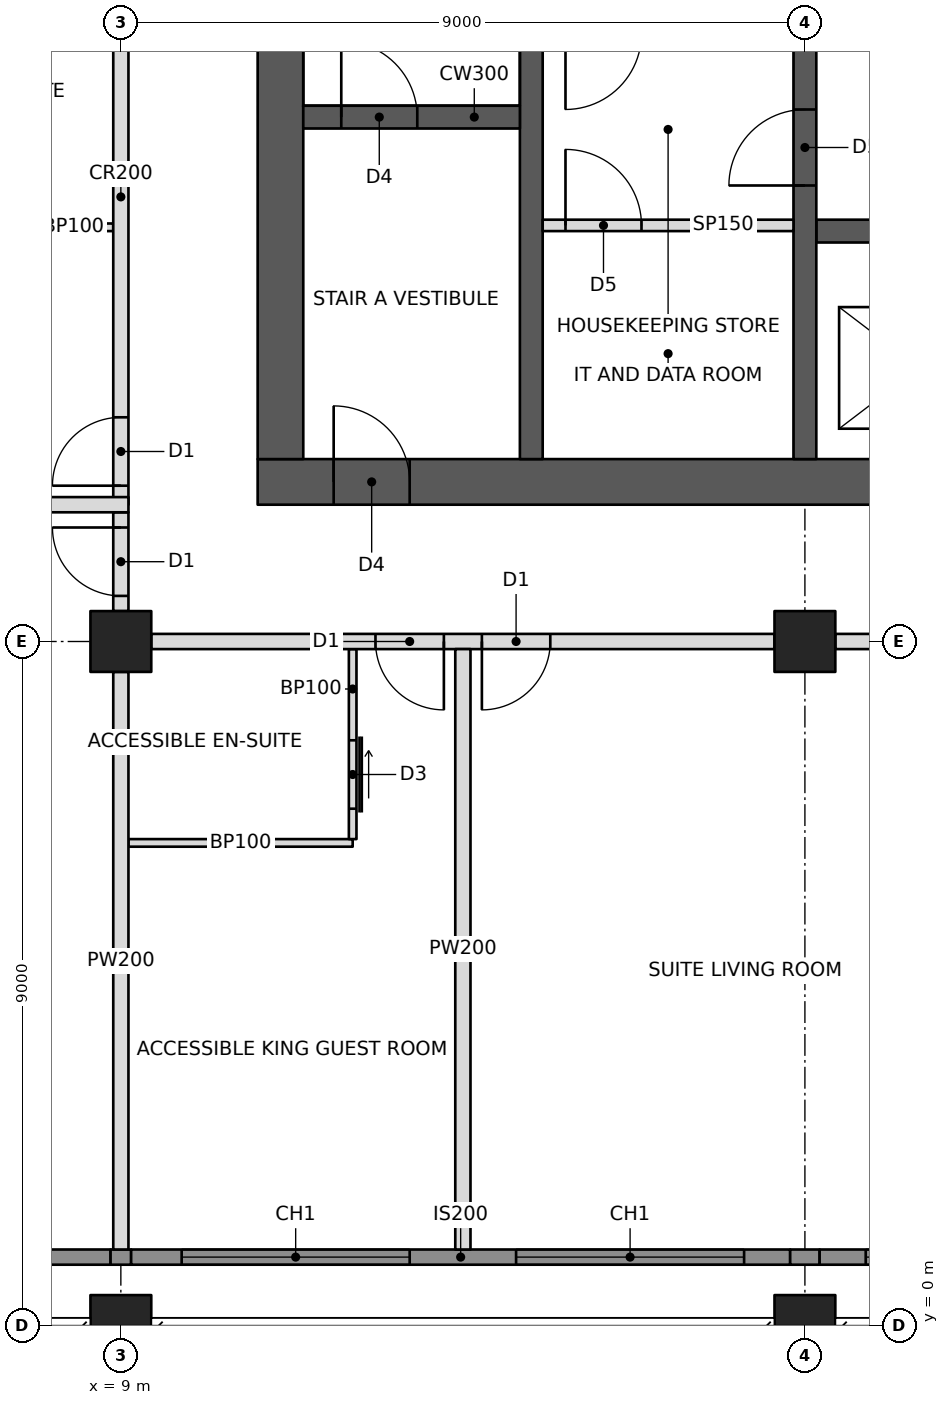
"""IFC4 building model, lengths in metres.
Left out: names, types, materials, properties, quantities, classifications, styles, units other than length and angle.
Written with IfcOpenShell. Run it as: python <this file> out.ifc"""

import sys

from ifc_helpers import new_model, si_unit, direction, frame, frame_2d, origin, origin_2d, place, context, subcontext, project, spatial, rectangle, hollow_rectangle, extrude, element, fill, save


model = new_model("IFC4")
c1 = context("Model", 3, precision=1e-05, world=origin(), true_north=direction((0.0, 1.0)))
c2 = subcontext(c1, "Body", "Model", "MODEL_VIEW")
j1 = project(units=[si_unit("LENGTHUNIT", "METRE"), si_unit("PLANEANGLEUNIT", "RADIAN")], contexts=[c1])
p1 = place(None, origin())
s1 = spatial("IfcSite", under=j1, at=p1, CompositionType="ELEMENT")
p2 = place(p1, origin())
s2 = spatial("IfcBuilding", under=s1, at=p2, CompositionType="ELEMENT")
p3 = place(p2, frame((0.0, 0.0, 194.4)))
s3 = spatial("IfcBuildingStorey", under=s2, at=p3, CompositionType="ELEMENT", Elevation=194.4)
p4 = place(p3, frame((9.0, 0.0, 0.0), z_axis=(0.0, 0.0, 1.0), x_axis=(1.0, 0.0, 0.0)))
e1 = element("IfcColumn", 1, at=p4, inside=s3, PredefinedType="COLUMN", context=c2, shape_type="SweptSolid", body=[
    extrude(hollow_rectangle(XDim=0.8, YDim=0.8, WallThickness=0.06, at=origin_2d()), origin(), (0.0, 0.0, 1.0), 3.4),
])
p5 = place(p3, frame((9.0, 9.0, 0.0), z_axis=(0.0, 0.0, 1.0), x_axis=(1.0, 0.0, 0.0)))
e2 = element("IfcColumn", 2, at=p5, inside=s3, PredefinedType="COLUMN", context=c2, shape_type="SweptSolid", body=[
    extrude(hollow_rectangle(XDim=0.8, YDim=0.8, WallThickness=0.05, at=origin_2d()), origin(), (0.0, 0.0, 1.0), 3.4),
])
p6 = place(p3, frame((18.0, 0.0, 0.0), z_axis=(0.0, 0.0, 1.0), x_axis=(1.0, 0.0, 0.0)))
e3 = element("IfcColumn", 3, at=p6, inside=s3, PredefinedType="COLUMN", context=c2, shape_type="SweptSolid", body=[
    extrude(hollow_rectangle(XDim=0.8, YDim=0.8, WallThickness=0.06, at=origin_2d()), origin(), (0.0, 0.0, 1.0), 3.4),
])
p7 = place(p3, frame((18.0, 9.0, 0.0), z_axis=(0.0, 0.0, 1.0), x_axis=(1.0, 0.0, 0.0)))
e4 = element("IfcColumn", 4, at=p7, inside=s3, PredefinedType="COLUMN", context=c2, shape_type="SweptSolid", body=[
    extrude(hollow_rectangle(XDim=0.8, YDim=0.8, WallThickness=0.05, at=origin_2d()), origin(), (0.0, 0.0, 1.0), 3.4),
])
p8 = place(p3, frame((10.8, 11.1, 0.0), z_axis=(0.0, 0.0, 1.0), x_axis=(1.0, 0.0, 0.0)))
e5 = element("IfcWall", 5, at=p8, inside=s3, PredefinedType="SHEAR", context=c2, shape_type="SweptSolid", body=[
    extrude(rectangle(XDim=23.4, YDim=0.6, at=frame_2d((11.7, 0.0))), origin(), (0.0, 0.0, 1.0), 3.4),
])
p9 = place(p8, frame((1.0, 0.0, 0.0)))
e6 = element("IfcOpeningElement", 6, at=p9, cuts=e5, PredefinedType="OPENING", context=c2, shape_type="SweptSolid", body=[
    extrude(rectangle(XDim=1.0, YDim=2.1, at=frame_2d((0.5, 1.05))), frame((0.0, 0.31, 0.0), z_axis=(0.0, -1.0, 0.0), x_axis=(1.0, 0.0, 0.0)), (0.0, 0.0, 1.0), 0.62),
])
p10 = place(p8, frame((17.2, 0.0, 0.0)))
e7 = element("IfcOpeningElement", 7, at=p10, cuts=e5, PredefinedType="OPENING", context=c2, shape_type="SweptSolid", body=[
    extrude(rectangle(XDim=1.8, YDim=2.1, at=frame_2d((0.9, 1.05))), frame((0.0, 0.31, 0.0), z_axis=(0.0, -1.0, 0.0), x_axis=(1.0, 0.0, 0.0)), (0.0, 0.0, 1.0), 0.62),
])
p11 = place(p3, frame((11.1, 11.4, 0.0), z_axis=(0.0, 0.0, 1.0), x_axis=(0.0, 1.0, 0.0)))
e8 = element("IfcWall", 8, at=p11, inside=s3, PredefinedType="SHEAR", context=c2, shape_type="SweptSolid", body=[
    extrude(rectangle(XDim=13.2, YDim=0.6, at=frame_2d((6.6, 0.0))), origin(), (0.0, 0.0, 1.0), 3.4),
])
p12 = place(p3, frame((14.4, 11.4, 0.0), z_axis=(0.0, 0.0, 1.0), x_axis=(0.0, 1.0, 0.0)))
e9 = element("IfcWall", 9, at=p12, inside=s3, PredefinedType="SHEAR", context=c2, shape_type="SweptSolid", body=[
    extrude(rectangle(XDim=13.2, YDim=0.3, at=frame_2d((6.6, 0.0))), origin(), (0.0, 0.0, 1.0), 3.4),
])
p13 = place(p3, frame((11.4, 15.9, 0.0), z_axis=(0.0, 0.0, 1.0), x_axis=(1.0, 0.0, 0.0)))
e10 = element("IfcWall", 10, at=p13, inside=s3, PredefinedType="SHEAR", context=c2, shape_type="SweptSolid", body=[
    extrude(rectangle(XDim=2.85, YDim=0.3, at=frame_2d((1.425, 0.0))), origin(), (0.0, 0.0, 1.0), 3.4),
])
p14 = place(p13, frame((0.5, 0.0, 0.0)))
e11 = element("IfcOpeningElement", 11, at=p14, cuts=e10, PredefinedType="OPENING", context=c2, shape_type="SweptSolid", body=[
    extrude(rectangle(XDim=1.0, YDim=2.1, at=frame_2d((0.5, 1.05))), frame((0.0, 0.16, 0.0), z_axis=(0.0, -1.0, 0.0), x_axis=(1.0, 0.0, 0.0)), (0.0, 0.0, 1.0), 0.32),
])
p15 = place(p3, frame((18.0, 11.4, 0.0), z_axis=(0.0, 0.0, 1.0), x_axis=(0.0, 1.0, 0.0)))
e12 = element("IfcWall", 12, at=p15, inside=s3, PredefinedType="SHEAR", context=c2, shape_type="SweptSolid", body=[
    extrude(rectangle(XDim=13.2, YDim=0.3, at=frame_2d((6.6, 0.0))), origin(), (0.0, 0.0, 1.0), 3.4),
])
p16 = place(p15, frame((3.6, 0.0, 0.0)))
e13 = element("IfcOpeningElement", 13, at=p16, cuts=e12, PredefinedType="OPENING", context=c2, shape_type="SweptSolid", body=[
    extrude(rectangle(XDim=1.0, YDim=2.1, at=frame_2d((0.5, 1.05))), frame((0.0, 0.16, 0.0), z_axis=(0.0, -1.0, 0.0), x_axis=(1.0, 0.0, 0.0)), (0.0, 0.0, 1.0), 0.32),
])
p17 = place(p15, frame((7.85, 0.0, 0.0)))
e14 = element("IfcOpeningElement", 14, at=p17, cuts=e12, PredefinedType="OPENING", context=c2, shape_type="SweptSolid", body=[
    extrude(rectangle(XDim=1.1, YDim=2.1, at=frame_2d((0.55, 1.05))), frame((0.0, 0.16, 0.0), z_axis=(0.0, -1.0, 0.0), x_axis=(1.0, 0.0, 0.0)), (0.0, 0.0, 1.0), 0.32),
])
p18 = place(p3, frame((18.15, 14.4, 0.0), z_axis=(0.0, 0.0, 1.0), x_axis=(1.0, 0.0, 0.0)))
e15 = element("IfcWall", 15, at=p18, inside=s3, PredefinedType="SHEAR", context=c2, shape_type="SweptSolid", body=[
    extrude(rectangle(XDim=9.0, YDim=0.3, at=frame_2d((4.5, 0.0))), origin(), (0.0, 0.0, 1.0), 3.4),
])
p19 = place(p18, frame((0.8, 0.0, 0.0)))
e16 = element("IfcOpeningElement", 16, at=p19, cuts=e15, PredefinedType="OPENING", context=c2, shape_type="SweptSolid", body=[
    extrude(rectangle(XDim=1.1, YDim=2.1, at=frame_2d((0.55, 1.05))), frame((0.0, 0.16, 0.0), z_axis=(0.0, -1.0, 0.0), x_axis=(1.0, 0.0, 0.0)), (0.0, 0.0, 1.0), 0.32),
])
p20 = place(p18, frame((6.75, 0.0, 0.0)))
e17 = element("IfcOpeningElement", 17, at=p20, cuts=e15, PredefinedType="OPENING", context=c2, shape_type="SweptSolid", body=[
    extrude(rectangle(XDim=1.2, YDim=2.1, at=frame_2d((0.6, 1.05))), frame((0.0, 0.16, 0.0), z_axis=(0.0, -1.0, 0.0), x_axis=(1.0, 0.0, 0.0)), (0.0, 0.0, 1.0), 0.32),
])
p21 = place(p18, frame((3.8, 0.0, 0.0)))
e18 = element("IfcOpeningElement", 18, at=p21, cuts=e15, PredefinedType="OPENING", context=c2, shape_type="SweptSolid", body=[
    extrude(rectangle(XDim=1.1, YDim=2.1, at=frame_2d((0.55, 1.05))), frame((0.0, 0.16, 0.0), z_axis=(0.0, -1.0, 0.0), x_axis=(1.0, 0.0, 0.0)), (0.0, 0.0, 1.0), 0.32),
])
p22 = place(p3, frame((3.0, 0.9, 0.0), z_axis=(0.0, 0.0, 1.0), x_axis=(1.0, 0.0, 0.0)))
e19 = element("IfcWall", 19, at=p22, inside=s3, PredefinedType="SOLIDWALL", context=c2, shape_type="SweptSolid", body=[
    extrude(rectangle(XDim=5.865, YDim=0.2, at=frame_2d((2.932, 0.0))), origin(), (0.0, 0.0, 1.0), 3.2),
])
p23 = place(p22, frame((1.45, 0.0, 0.6)))
e20 = element("IfcOpeningElement", 20, at=p23, cuts=e19, PredefinedType="OPENING", context=c2, shape_type="SweptSolid", body=[
    extrude(rectangle(XDim=3.0, YDim=2.2, at=frame_2d((1.5, 1.1))), frame((0.0, 0.11, 0.0), z_axis=(0.0, -1.0, 0.0), x_axis=(1.0, 0.0, 0.0)), (0.0, 0.0, 1.0), 0.22),
])
p24 = place(p3, frame((9.4, 9.0, 0.0), z_axis=(0.0, 0.0, 1.0), x_axis=(1.0, 0.0, 0.0)))
e21 = element("IfcWall", 21, at=p24, inside=s3, PredefinedType="PARTITIONING", context=c2, shape_type="SweptSolid", body=[
    extrude(rectangle(XDim=8.2, YDim=0.2, at=frame_2d((4.1, 0.0))), origin(), (0.0, 0.0, 1.0), 2.405),
])
p25 = place(p24, frame((2.95, 0.0, 0.0)))
e22 = element("IfcOpeningElement", 22, at=p25, cuts=e21, PredefinedType="OPENING", context=c2, shape_type="SweptSolid", body=[
    extrude(rectangle(XDim=0.9, YDim=2.1, at=frame_2d((0.45, 1.05))), frame((0.0, 0.11, 0.0), z_axis=(0.0, -1.0, 0.0), x_axis=(1.0, 0.0, 0.0)), (0.0, 0.0, 1.0), 0.22),
])
p26 = place(p24, frame((4.35, 0.0, 0.0)))
e23 = element("IfcOpeningElement", 23, at=p26, cuts=e21, PredefinedType="OPENING", context=c2, shape_type="SweptSolid", body=[
    extrude(rectangle(XDim=0.9, YDim=2.1, at=frame_2d((0.45, 1.05))), frame((0.0, 0.11, 0.0), z_axis=(0.0, -1.0, 0.0), x_axis=(1.0, 0.0, 0.0)), (0.0, 0.0, 1.0), 0.22),
])
p27 = place(p3, frame((18.4, 9.0, 0.0), z_axis=(0.0, 0.0, 1.0), x_axis=(1.0, 0.0, 0.0)))
e24 = element("IfcWall", 24, at=p27, inside=s3, PredefinedType="PARTITIONING", context=c2, shape_type="SweptSolid", body=[
    extrude(rectangle(XDim=8.2, YDim=0.2, at=frame_2d((4.1, 0.0))), origin(), (0.0, 0.0, 1.0), 2.405),
])
p28 = place(p27, frame((4.35, 0.0, 0.0)))
e25 = element("IfcOpeningElement", 25, at=p28, cuts=e24, PredefinedType="OPENING", context=c2, shape_type="SweptSolid", body=[
    extrude(rectangle(XDim=0.9, YDim=2.1, at=frame_2d((0.45, 1.05))), frame((0.0, 0.11, 0.0), z_axis=(0.0, -1.0, 0.0), x_axis=(1.0, 0.0, 0.0)), (0.0, 0.0, 1.0), 0.22),
])
p29 = place(p3, frame((9.0, 10.8, 0.0), z_axis=(0.0, 0.0, 1.0), x_axis=(0.0, 1.0, 0.0)))
e26 = element("IfcWall", 26, at=p29, inside=s3, PredefinedType="PARTITIONING", context=c2, shape_type="SweptSolid", body=[
    extrude(rectangle(XDim=6.8, YDim=0.2, at=frame_2d((3.4, 0.0))), origin(), (0.0, 0.0, 1.0), 2.405),
])
p30 = place(p29, frame((0.25, 0.0, 0.0)))
e27 = element("IfcOpeningElement", 27, at=p30, cuts=e26, PredefinedType="OPENING", context=c2, shape_type="SweptSolid", body=[
    extrude(rectangle(XDim=0.9, YDim=2.1, at=frame_2d((0.45, 1.05))), frame((0.0, 0.11, 0.0), z_axis=(0.0, -1.0, 0.0), x_axis=(1.0, 0.0, 0.0)), (0.0, 0.0, 1.0), 0.22),
])
p31 = place(p3, frame((1.0, 10.8, 0.0), z_axis=(0.0, 0.0, 1.0), x_axis=(1.0, 0.0, 0.0)))
e28 = element("IfcWall", 28, at=p31, inside=s3, PredefinedType="PARTITIONING", context=c2, shape_type="SweptSolid", body=[
    extrude(rectangle(XDim=8.1, YDim=0.2, at=frame_2d((4.05, 0.0))), origin(), (0.0, 0.0, 1.0), 2.404),
])
p32 = place(p3, frame((9.0, 8.6, 0.0), z_axis=(0.0, 0.0, 1.0), x_axis=(0.0, -1.0, 0.0)))
e29 = element("IfcWall", 29, at=p32, inside=s3, PredefinedType="PARTITIONING", context=c2, shape_type="SweptSolid", body=[
    extrude(rectangle(XDim=7.6, YDim=0.2, at=frame_2d((3.8, 0.0))), origin(), (0.0, 0.0, 1.0), 2.438),
])
p33 = place(p3, frame((13.5, 8.9, 0.0), z_axis=(0.0, 0.0, 1.0), x_axis=(0.0, -1.0, 0.0)))
e30 = element("IfcWall", 30, at=p33, inside=s3, PredefinedType="PARTITIONING", context=c2, shape_type="SweptSolid", body=[
    extrude(rectangle(XDim=7.9, YDim=0.2, at=frame_2d((3.95, 0.0))), origin(), (0.0, 0.0, 1.0), 2.404),
])
p34 = place(p3, frame((9.1, 6.35, 0.0), z_axis=(0.0, 0.0, 1.0), x_axis=(1.0, 0.0, 0.0)))
e31 = element("IfcWall", 31, at=p34, inside=s3, PredefinedType="PARTITIONING", context=c2, shape_type="SweptSolid", body=[
    extrude(rectangle(XDim=2.95, YDim=0.1, at=frame_2d((1.475, 0.0))), origin(), (0.0, 0.0, 1.0), 2.438),
])
p35 = place(p3, frame((12.05, 8.9, 0.0), z_axis=(0.0, 0.0, 1.0), x_axis=(0.0, -1.0, 0.0)))
e32 = element("IfcWall", 32, at=p35, inside=s3, PredefinedType="PARTITIONING", context=c2, shape_type="SweptSolid", body=[
    extrude(rectangle(XDim=2.5, YDim=0.1, at=frame_2d((1.25, 0.0))), origin(), (0.0, 0.0, 1.0), 2.404),
])
p36 = place(p35, frame((1.2, 0.0, 0.0)))
e33 = element("IfcOpeningElement", 33, at=p36, cuts=e32, PredefinedType="OPENING", context=c2, shape_type="SweptSolid", body=[
    extrude(rectangle(XDim=0.9, YDim=2.1, at=frame_2d((0.45, 1.05))), frame((0.0, 0.06, 0.0), z_axis=(0.0, -1.0, 0.0), x_axis=(1.0, 0.0, 0.0)), (0.0, 0.0, 1.0), 0.12),
])
p37 = place(p3, frame((8.9, 14.45, 0.0), z_axis=(0.0, 0.0, 1.0), x_axis=(-1.0, 0.0, 0.0)))
e34 = element("IfcWall", 34, at=p37, inside=s3, PredefinedType="PARTITIONING", context=c2, shape_type="SweptSolid", body=[
    extrude(rectangle(XDim=2.5, YDim=0.1, at=frame_2d((1.25, 0.0))), origin(), (0.0, 0.0, 1.0), 2.404),
])
p38 = place(p37, frame((1.2, 0.0, 0.0)))
e35 = element("IfcOpeningElement", 35, at=p38, cuts=e34, PredefinedType="OPENING", context=c2, shape_type="SweptSolid", body=[
    extrude(rectangle(XDim=0.9, YDim=2.1, at=frame_2d((0.45, 1.05))), frame((0.0, 0.06, 0.0), z_axis=(0.0, -1.0, 0.0), x_axis=(1.0, 0.0, 0.0)), (0.0, 0.0, 1.0), 0.12),
])
p39 = place(p3, frame((9.0, 9.4, 0.0), z_axis=(0.0, 0.0, 1.0), x_axis=(0.0, 1.0, 0.0)))
e36 = element("IfcWall", 36, at=p39, inside=s3, PredefinedType="PARTITIONING", context=c2, shape_type="SweptSolid", body=[
    extrude(rectangle(XDim=1.3, YDim=0.2, at=frame_2d((0.65, 0.0))), origin(), (0.0, 0.0, 1.0), 2.405),
])
p40 = place(p39, frame((0.2, 0.0, 0.0)))
e37 = element("IfcOpeningElement", 37, at=p40, cuts=e36, PredefinedType="OPENING", context=c2, shape_type="SweptSolid", body=[
    extrude(rectangle(XDim=0.9, YDim=2.1, at=frame_2d((0.45, 1.05))), frame((0.0, 0.11, 0.0), z_axis=(0.0, -1.0, 0.0), x_axis=(1.0, 0.0, 0.0)), (0.0, 0.0, 1.0), 0.22),
])
p41 = place(p3, frame((14.55, 14.475, 0.0), z_axis=(0.0, 0.0, 1.0), x_axis=(1.0, 0.0, 0.0)))
e38 = element("IfcWall", 38, at=p41, inside=s3, PredefinedType="PARTITIONING", context=c2, shape_type="SweptSolid", body=[
    extrude(rectangle(XDim=3.3, YDim=0.15, at=frame_2d((1.65, 0.0))), origin(), (0.0, 0.0, 1.0), 3.2),
])
p42 = place(p41, frame((0.3, 0.0, 0.0)))
e39 = element("IfcOpeningElement", 39, at=p42, cuts=e38, PredefinedType="OPENING", context=c2, shape_type="SweptSolid", body=[
    extrude(rectangle(XDim=1.0, YDim=2.1, at=frame_2d((0.5, 1.05))), frame((0.0, 0.085, 0.0), z_axis=(0.0, -1.0, 0.0), x_axis=(1.0, 0.0, 0.0)), (0.0, 0.0, 1.0), 0.17),
])
p43 = place(p3, frame((8.865, 0.9, 0.0), z_axis=(0.0, 0.0, 1.0), x_axis=(1.0, 0.0, 0.0)))
e40 = element("IfcWall", 40, at=p43, inside=s3, PredefinedType="SOLIDWALL", context=c2, shape_type="SweptSolid", body=[
    extrude(rectangle(XDim=0.271, YDim=0.2, at=frame_2d((0.135, 0.0))), origin(), (0.0, 0.0, 1.0), 2.438),
])
p44 = place(p3, frame((9.135, 0.9, 0.0), z_axis=(0.0, 0.0, 1.0), x_axis=(1.0, 0.0, 0.0)))
e41 = element("IfcWall", 41, at=p44, inside=s3, PredefinedType="SOLIDWALL", context=c2, shape_type="SweptSolid", body=[
    extrude(rectangle(XDim=8.671, YDim=0.2, at=frame_2d((4.335, 0.0))), origin(), (0.0, 0.0, 1.0), 3.2),
])
p45 = place(p44, frame((0.665, 0.0, 0.6)))
e42 = element("IfcOpeningElement", 42, at=p45, cuts=e41, PredefinedType="OPENING", context=c2, shape_type="SweptSolid", body=[
    extrude(rectangle(XDim=3.0, YDim=2.2, at=frame_2d((1.5, 1.1))), frame((0.0, 0.11, 0.0), z_axis=(0.0, -1.0, 0.0), x_axis=(1.0, 0.0, 0.0)), (0.0, 0.0, 1.0), 0.22),
])
p46 = place(p44, frame((5.065, 0.0, 0.6)))
e43 = element("IfcOpeningElement", 43, at=p46, cuts=e41, PredefinedType="OPENING", context=c2, shape_type="SweptSolid", body=[
    extrude(rectangle(XDim=3.0, YDim=2.2, at=frame_2d((1.5, 1.1))), frame((0.0, 0.11, 0.0), z_axis=(0.0, -1.0, 0.0), x_axis=(1.0, 0.0, 0.0)), (0.0, 0.0, 1.0), 0.22),
])
p47 = place(p3, frame((17.806, 0.9, 0.0), z_axis=(0.0, 0.0, 1.0), x_axis=(1.0, 0.0, 0.0)))
e44 = element("IfcWall", 44, at=p47, inside=s3, PredefinedType="SOLIDWALL", context=c2, shape_type="SweptSolid", body=[
    extrude(rectangle(XDim=0.388, YDim=0.2, at=frame_2d((0.194, 0.0))), origin(), (0.0, 0.0, 1.0), 2.404),
])
p48 = place(p3, frame((18.194, 0.9, 0.0), z_axis=(0.0, 0.0, 1.0), x_axis=(1.0, 0.0, 0.0)))
e45 = element("IfcWall", 45, at=p48, inside=s3, PredefinedType="SOLIDWALL", context=c2, shape_type="SweptSolid", body=[
    extrude(rectangle(XDim=8.612, YDim=0.2, at=frame_2d((4.306, 0.0))), origin(), (0.0, 0.0, 1.0), 3.2),
])
p49 = place(p48, frame((0.606, 0.0, 0.6)))
e46 = element("IfcOpeningElement", 46, at=p49, cuts=e45, PredefinedType="OPENING", context=c2, shape_type="SweptSolid", body=[
    extrude(rectangle(XDim=3.0, YDim=2.2, at=frame_2d((1.5, 1.1))), frame((0.0, 0.11, 0.0), z_axis=(0.0, -1.0, 0.0), x_axis=(1.0, 0.0, 0.0)), (0.0, 0.0, 1.0), 0.22),
])
p50 = place(p48, frame((5.006, 0.0, 0.6)))
e47 = element("IfcOpeningElement", 47, at=p50, cuts=e45, PredefinedType="OPENING", context=c2, shape_type="SweptSolid", body=[
    extrude(rectangle(XDim=3.0, YDim=2.2, at=frame_2d((1.5, 1.1))), frame((0.0, 0.11, 0.0), z_axis=(0.0, -1.0, 0.0), x_axis=(1.0, 0.0, 0.0)), (0.0, 0.0, 1.0), 0.22),
])
p51 = place(p45, origin())
e48 = element("IfcWindow", 48, at=p51, inside=s3, PartitioningType="TRIPLE_PANEL_VERTICAL", PredefinedType="WINDOW", context=c2, shape_type="SweptSolid", body=[
    extrude(rectangle(XDim=3.0, YDim=2.2, at=frame_2d((1.5, 1.1))), frame((0.0, 0.03, 0.0), z_axis=(0.0, -1.0, 0.0), x_axis=(1.0, 0.0, 0.0)), (0.0, 0.0, 1.0), 0.06),
])
fill(e42, e48)
p52 = place(p46, origin())
e49 = element("IfcWindow", 49, at=p52, inside=s3, PartitioningType="TRIPLE_PANEL_VERTICAL", PredefinedType="WINDOW", context=c2, shape_type="SweptSolid", body=[
    extrude(rectangle(XDim=3.0, YDim=2.2, at=frame_2d((1.5, 1.1))), frame((0.0, 0.03, 0.0), z_axis=(0.0, -1.0, 0.0), x_axis=(1.0, 0.0, 0.0)), (0.0, 0.0, 1.0), 0.06),
])
fill(e43, e49)
p53 = place(p49, origin())
e50 = element("IfcWindow", 50, at=p53, inside=s3, PartitioningType="TRIPLE_PANEL_VERTICAL", PredefinedType="WINDOW", context=c2, shape_type="SweptSolid", body=[
    extrude(rectangle(XDim=3.0, YDim=2.2, at=frame_2d((1.5, 1.1))), frame((0.0, 0.03, 0.0), z_axis=(0.0, -1.0, 0.0), x_axis=(1.0, 0.0, 0.0)), (0.0, 0.0, 1.0), 0.06),
])
fill(e46, e50)
p54 = place(p36, origin())
e51 = element("IfcDoor", 51, at=p54, inside=s3, OperationType="SLIDING_TO_LEFT", PredefinedType="DOOR", context=c2, shape_type="SweptSolid", body=[
    extrude(rectangle(XDim=0.9, YDim=2.1, at=frame_2d((0.45, 1.05))), frame((0.0, 0.025, 0.0), z_axis=(0.0, -1.0, 0.0), x_axis=(1.0, 0.0, 0.0)), (0.0, 0.0, 1.0), 0.05),
])
fill(e33, e51)
p55 = place(p25, frame((0.9, 0.0, 0.0), z_axis=(0.0, 0.0, 1.0), x_axis=(-1.0, 0.0, 0.0)))
e52 = element("IfcDoor", 52, at=p55, inside=s3, OperationType="SINGLE_SWING_LEFT", PredefinedType="DOOR", context=c2, shape_type="SweptSolid", body=[
    extrude(rectangle(XDim=0.9, YDim=2.1, at=frame_2d((0.45, 1.05))), frame((0.0, 0.025, 0.0), z_axis=(0.0, -1.0, 0.0), x_axis=(1.0, 0.0, 0.0)), (0.0, 0.0, 1.0), 0.05),
])
fill(e22, e52)
p56 = place(p26, frame((0.9, 0.0, 0.0), z_axis=(0.0, 0.0, 1.0), x_axis=(-1.0, 0.0, 0.0)))
e53 = element("IfcDoor", 53, at=p56, inside=s3, OperationType="SINGLE_SWING_RIGHT", PredefinedType="DOOR", context=c2, shape_type="SweptSolid", body=[
    extrude(rectangle(XDim=0.9, YDim=2.1, at=frame_2d((0.45, 1.05))), frame((0.0, 0.025, 0.0), z_axis=(0.0, -1.0, 0.0), x_axis=(1.0, 0.0, 0.0)), (0.0, 0.0, 1.0), 0.05),
])
fill(e23, e53)
p57 = place(p30, origin())
e54 = element("IfcDoor", 54, at=p57, inside=s3, OperationType="SINGLE_SWING_LEFT", PredefinedType="DOOR", context=c2, shape_type="SweptSolid", body=[
    extrude(rectangle(XDim=0.9, YDim=2.1, at=frame_2d((0.45, 1.05))), frame((0.0, 0.025, 0.0), z_axis=(0.0, -1.0, 0.0), x_axis=(1.0, 0.0, 0.0)), (0.0, 0.0, 1.0), 0.05),
])
fill(e27, e54)
p58 = place(p40, origin())
e55 = element("IfcDoor", 55, at=p58, inside=s3, OperationType="SINGLE_SWING_RIGHT", PredefinedType="DOOR", context=c2, shape_type="SweptSolid", body=[
    extrude(rectangle(XDim=0.9, YDim=2.1, at=frame_2d((0.45, 1.05))), frame((0.0, 0.025, 0.0), z_axis=(0.0, -1.0, 0.0), x_axis=(1.0, 0.0, 0.0)), (0.0, 0.0, 1.0), 0.05),
])
fill(e37, e55)
p59 = place(p42, origin())
e56 = element("IfcDoor", 56, at=p59, inside=s3, OperationType="SINGLE_SWING_LEFT", PredefinedType="DOOR", context=c2, shape_type="SweptSolid", body=[
    extrude(rectangle(XDim=1.0, YDim=2.1, at=frame_2d((0.5, 1.05))), frame((0.0, 0.025, 0.0), z_axis=(0.0, -1.0, 0.0), x_axis=(1.0, 0.0, 0.0)), (0.0, 0.0, 1.0), 0.05),
])
fill(e39, e56)
p60 = place(p9, origin())
e57 = element("IfcDoor", 57, at=p60, inside=s3, OperationType="SINGLE_SWING_LEFT", PredefinedType="DOOR", context=c2, shape_type="SweptSolid", body=[
    extrude(rectangle(XDim=1.0, YDim=2.1, at=frame_2d((0.5, 1.05))), frame((0.0, 0.025, 0.0), z_axis=(0.0, -1.0, 0.0), x_axis=(1.0, 0.0, 0.0)), (0.0, 0.0, 1.0), 0.05),
])
fill(e6, e57)
p61 = place(p14, origin())
e58 = element("IfcDoor", 58, at=p61, inside=s3, OperationType="SINGLE_SWING_LEFT", PredefinedType="DOOR", context=c2, shape_type="SweptSolid", body=[
    extrude(rectangle(XDim=1.0, YDim=2.1, at=frame_2d((0.5, 1.05))), frame((0.0, 0.025, 0.0), z_axis=(0.0, -1.0, 0.0), x_axis=(1.0, 0.0, 0.0)), (0.0, 0.0, 1.0), 0.05),
])
fill(e11, e58)
p62 = place(p16, origin())
e59 = element("IfcDoor", 59, at=p62, inside=s3, OperationType="SINGLE_SWING_LEFT", PredefinedType="DOOR", context=c2, shape_type="SweptSolid", body=[
    extrude(rectangle(XDim=1.0, YDim=2.1, at=frame_2d((0.5, 1.05))), frame((0.0, 0.025, 0.0), z_axis=(0.0, -1.0, 0.0), x_axis=(1.0, 0.0, 0.0)), (0.0, 0.0, 1.0), 0.05),
])
fill(e13, e59)
save(model, sys.argv[1])
